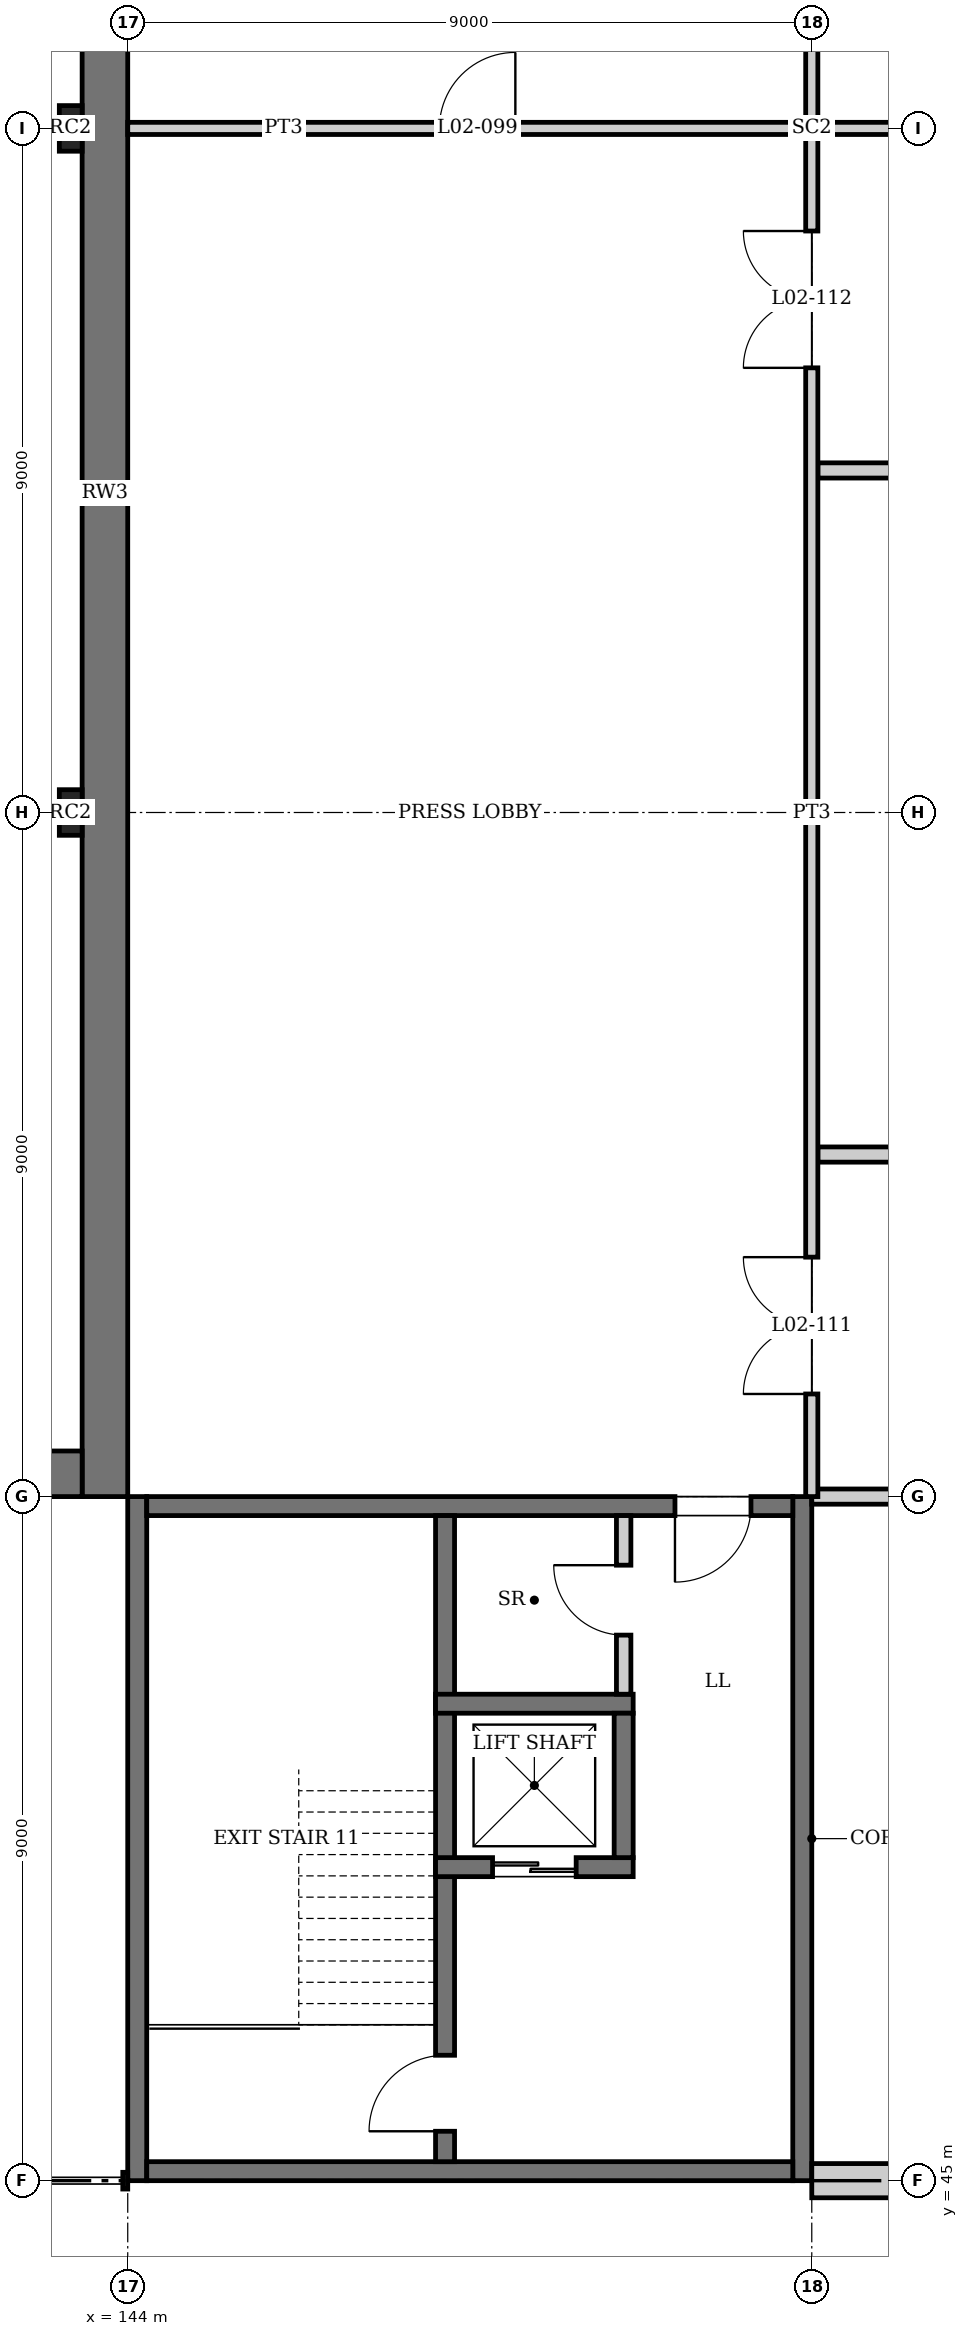
"""IFC4 building model, lengths in metres.
Left out: names, types, materials, properties, quantities, classifications, styles, units other than length and angle.
Written with IfcOpenShell. Run it as: python <this file> out.ifc"""

import sys

from ifc_helpers import new_model, si_unit, direction, frame, frame_2d, origin, origin_2d, place, context, subcontext, project, spatial, rectangle, i_section, extrude, element, fill, save


model = new_model("IFC4")
c1 = context("Model", 3, precision=1e-05, world=origin(), true_north=direction((0.0, 1.0)))
c2 = subcontext(c1, "Body", "Model", "MODEL_VIEW")
j1 = project(units=[si_unit("LENGTHUNIT", "METRE"), si_unit("PLANEANGLEUNIT", "RADIAN")], contexts=[c1])
p1 = place(None, origin())
s1 = spatial("IfcSite", under=j1, at=p1, CompositionType="ELEMENT")
p2 = place(p1, origin())
s2 = spatial("IfcBuilding", under=s1, at=p2, CompositionType="ELEMENT")
p3 = place(p2, frame((0.0, 0.0, 10.5)))
s3 = spatial("IfcBuildingStorey", under=s2, at=p3, CompositionType="ELEMENT", Elevation=10.5)
p4 = place(p3, frame((153.0, 72.0, 0.0), z_axis=(0.0, 0.0, 1.0), x_axis=(0.0, 1.0, 0.0)))
e1 = element("IfcColumn", 1, at=p4, inside=s3, PredefinedType="COLUMN", context=c2, shape_type="SweptSolid", body=[
    extrude(i_section(OverallWidth=0.256, OverallDepth=0.26, WebThickness=0.01, FlangeThickness=0.017, at=origin_2d()), origin(), (0.0, 0.0, 1.0), 4.5),
])
for number, where, z_axis, x_axis in (
    (2, (144.125, 45.0, 0.0), (0.0, 0.0, 1.0), (0.0, 1.0, 0.0)),
    (3, (152.875, 45.0, 0.0), (0.0, 0.0, 1.0), (0.0, 1.0, 0.0)),
):
    element("IfcWall", number, at=place(p3, frame(where, z_axis=z_axis, x_axis=x_axis)), inside=s3, PredefinedType="SHEAR", context=c2, shape_type="SweptSolid", body=[
        extrude(rectangle(XDim=9.0, YDim=0.25, at=frame_2d((4.5, 0.0))), origin(), (0.0, 0.0, 1.0), 4.35),
    ])
p5 = place(p3, frame((144.25, 45.125, 0.0), z_axis=(0.0, 0.0, 1.0), x_axis=(1.0, 0.0, 0.0)))
e4 = element("IfcWall", 4, at=p5, inside=s3, PredefinedType="SHEAR", context=c2, shape_type="SweptSolid", body=[
    extrude(rectangle(XDim=8.5, YDim=0.25, at=frame_2d((4.25, 0.0))), origin(), (0.0, 0.0, 1.0), 4.35),
])
p6 = place(p3, frame((144.25, 53.875, 0.0), z_axis=(0.0, 0.0, 1.0), x_axis=(1.0, 0.0, 0.0)))
e5 = element("IfcWall", 5, at=p6, inside=s3, PredefinedType="SHEAR", context=c2, shape_type="SweptSolid", body=[
    extrude(rectangle(XDim=8.5, YDim=0.25, at=frame_2d((4.25, 0.0))), origin(), (0.0, 0.0, 1.0), 4.35),
])
p7 = place(p6, frame((6.95, 0.0, 0.0)))
e6 = element("IfcOpeningElement", 6, at=p7, cuts=e5, PredefinedType="OPENING", context=c2, shape_type="SweptSolid", body=[
    extrude(rectangle(XDim=1.0, YDim=2.1, at=frame_2d((0.5, 1.05))), frame((0.0, 0.135, 0.0), z_axis=(0.0, -1.0, 0.0), x_axis=(1.0, 0.0, 0.0)), (0.0, 0.0, 1.0), 0.27),
])
p8 = place(p3, frame((143.7, 54.0, 0.0), z_axis=(0.0, 0.0, 1.0), x_axis=(0.0, 1.0, 0.0)))
e7 = element("IfcWall", 7, at=p8, inside=s3, PredefinedType="SHEAR", context=c2, shape_type="SweptSolid", body=[
    extrude(rectangle(XDim=26.4, YDim=0.6, at=frame_2d((13.2, 0.0))), origin(), (0.0, 0.0, 1.0), 4.5),
])
p9 = place(p3, frame((117.6, 54.3, 0.0), z_axis=(0.0, 0.0, 1.0), x_axis=(1.0, 0.0, 0.0)))
e8 = element("IfcWall", 8, at=p9, inside=s3, PredefinedType="SHEAR", context=c2, shape_type="SweptSolid", body=[
    extrude(rectangle(XDim=25.8, YDim=0.6, at=frame_2d((12.9, 0.0))), origin(), (0.0, 0.0, 1.0), 4.5),
])
p10 = place(p9, frame((1.0, 0.0, 0.0)))
e9 = element("IfcOpeningElement", 9, at=p10, cuts=e8, PredefinedType="OPENING", context=c2, shape_type="SweptSolid", body=[
    extrude(rectangle(XDim=1.0, YDim=2.1, at=frame_2d((0.5, 1.05))), frame((0.0, 0.31, 0.0), z_axis=(0.0, -1.0, 0.0), x_axis=(1.0, 0.0, 0.0)), (0.0, 0.0, 1.0), 0.62),
])
for number, where, z_axis, x_axis in (
    (10, (143.25, 63.0, 0.0), (0.0, 0.0, 1.0), (0.0, 1.0, 0.0)),
    (11, (143.25, 72.0, 0.0), (0.0, 0.0, 1.0), (0.0, 1.0, 0.0)),
):
    element("IfcColumn", number, at=place(p3, frame(where, z_axis=z_axis, x_axis=x_axis)), inside=s3, PredefinedType="PILASTER", context=c2, shape_type="SweptSolid", body=[
        extrude(rectangle(XDim=0.6, YDim=0.3, at=origin_2d()), origin(), (0.0, 0.0, 1.0), 4.5),
    ])
p11 = place(p3, frame((153.0, 45.0, 0.0), z_axis=(0.0, 0.0, 1.0), x_axis=(1.0, 0.0, 0.0)))
e12 = element("IfcWall", 12, at=p11, inside=s3, PredefinedType="SOLIDWALL", context=c2, shape_type="SweptSolid", body=[
    extrude(rectangle(XDim=8.873, YDim=0.45, at=frame_2d((4.437, 0.0))), origin(), (0.0, 0.0, 1.0), 3.991),
])
p12 = place(p11, frame((1.05, 0.0, 0.9)))
e13 = element("IfcOpeningElement", 13, at=p12, cuts=e12, PredefinedType="OPENING", context=c2, shape_type="SweptSolid", body=[
    extrude(rectangle(XDim=2.4, YDim=2.1, at=frame_2d((1.2, 1.05))), frame((0.0, 0.235, 0.0), z_axis=(0.0, -1.0, 0.0), x_axis=(1.0, 0.0, 0.0)), (0.0, 0.0, 1.0), 0.47),
])
p13 = place(p11, frame((5.55, 0.0, 0.9)))
e14 = element("IfcOpeningElement", 14, at=p13, cuts=e12, PredefinedType="OPENING", context=c2, shape_type="SweptSolid", body=[
    extrude(rectangle(XDim=2.4, YDim=2.1, at=frame_2d((1.2, 1.05))), frame((0.0, 0.235, 0.0), z_axis=(0.0, -1.0, 0.0), x_axis=(1.0, 0.0, 0.0)), (0.0, 0.0, 1.0), 0.47),
])
p14 = place(p3, frame((148.175, 45.25, 0.0), z_axis=(0.0, 0.0, 1.0), x_axis=(0.0, 1.0, 0.0)))
e15 = element("IfcWall", 15, at=p14, inside=s3, PredefinedType="SOLIDWALL", context=c2, shape_type="SweptSolid", body=[
    extrude(rectangle(XDim=8.5, YDim=0.25, at=frame_2d((4.25, 0.0))), origin(), (0.0, 0.0, 1.0), 4.35),
])
p15 = place(p14, frame((0.4, 0.0, 0.0)))
e16 = element("IfcOpeningElement", 16, at=p15, cuts=e15, PredefinedType="OPENING", context=c2, shape_type="SweptSolid", body=[
    extrude(rectangle(XDim=1.0, YDim=2.1, at=frame_2d((0.5, 1.05))), frame((0.0, 0.135, 0.0), z_axis=(0.0, -1.0, 0.0), x_axis=(1.0, 0.0, 0.0)), (0.0, 0.0, 1.0), 0.27),
])
p16 = place(p3, frame((148.05, 49.125, 0.0), z_axis=(0.0, 0.0, 1.0), x_axis=(1.0, 0.0, 0.0)))
e17 = element("IfcWall", 17, at=p16, inside=s3, PredefinedType="SOLIDWALL", context=c2, shape_type="SweptSolid", body=[
    extrude(rectangle(XDim=2.6, YDim=0.25, at=frame_2d((1.3, 0.0))), origin(), (0.0, 0.0, 1.0), 4.35),
])
p17 = place(p16, frame((0.75, 0.0, 0.0)))
e18 = element("IfcOpeningElement", 18, at=p17, cuts=e17, PredefinedType="OPENING", context=c2, shape_type="SweptSolid", body=[
    extrude(rectangle(XDim=1.1, YDim=2.1, at=frame_2d((0.55, 1.05))), frame((0.0, 0.135, 0.0), z_axis=(0.0, -1.0, 0.0), x_axis=(1.0, 0.0, 0.0)), (0.0, 0.0, 1.0), 0.27),
])
p18 = place(p3, frame((148.05, 51.275, 0.0), z_axis=(0.0, 0.0, 1.0), x_axis=(1.0, 0.0, 0.0)))
e19 = element("IfcWall", 19, at=p18, inside=s3, PredefinedType="SOLIDWALL", context=c2, shape_type="SweptSolid", body=[
    extrude(rectangle(XDim=2.6, YDim=0.25, at=frame_2d((1.3, 0.0))), origin(), (0.0, 0.0, 1.0), 4.35),
])
p19 = place(p3, frame((150.525, 49.25, 0.0), z_axis=(0.0, 0.0, 1.0), x_axis=(0.0, 1.0, 0.0)))
e20 = element("IfcWall", 20, at=p19, inside=s3, PredefinedType="SOLIDWALL", context=c2, shape_type="SweptSolid", body=[
    extrude(rectangle(XDim=1.9, YDim=0.25, at=frame_2d((0.95, 0.0))), origin(), (0.0, 0.0, 1.0), 4.35),
])
p20 = place(p3, frame((153.0, 54.0, 0.0), z_axis=(0.0, 0.0, 1.0), x_axis=(1.0, 0.0, 0.0)))
e21 = element("IfcWall", 21, at=p20, inside=s3, PredefinedType="PARTITIONING", context=c2, shape_type="SweptSolid", body=[
    extrude(rectangle(XDim=8.87, YDim=0.2, at=frame_2d((4.435, 0.0))), origin(), (0.0, 0.0, 1.0), 3.738),
])
p21 = place(p20, frame((6.6, 0.0, 0.0)))
e22 = element("IfcOpeningElement", 22, at=p21, cuts=e21, PredefinedType="OPENING", context=c2, shape_type="SweptSolid", body=[
    extrude(rectangle(XDim=1.8, YDim=2.1, at=frame_2d((0.9, 1.05))), frame((0.0, 0.11, 0.0), z_axis=(0.0, -1.0, 0.0), x_axis=(1.0, 0.0, 0.0)), (0.0, 0.0, 1.0), 0.22),
])
p22 = place(p3, frame((153.08, 58.5, 0.0), z_axis=(0.0, 0.0, 1.0), x_axis=(1.0, 0.0, 0.0)))
e23 = element("IfcWall", 23, at=p22, inside=s3, PredefinedType="PARTITIONING", context=c2, shape_type="SweptSolid", body=[
    extrude(rectangle(XDim=26.77, YDim=0.2, at=frame_2d((13.385, 0.0))), origin(), (0.0, 0.0, 1.0), 3.65),
])
p23 = place(p22, frame((4.02, 0.0, 0.0)))
e24 = element("IfcOpeningElement", 24, at=p23, cuts=e23, PredefinedType="OPENING", context=c2, shape_type="SweptSolid", body=[
    extrude(rectangle(XDim=1.0, YDim=2.1, at=frame_2d((0.5, 1.05))), frame((0.0, 0.11, 0.0), z_axis=(0.0, -1.0, 0.0), x_axis=(1.0, 0.0, 0.0)), (0.0, 0.0, 1.0), 0.22),
])
p24 = place(p22, frame((17.02, 0.0, 0.0)))
e25 = element("IfcOpeningElement", 25, at=p24, cuts=e23, PredefinedType="OPENING", context=c2, shape_type="SweptSolid", body=[
    extrude(rectangle(XDim=1.8, YDim=2.1, at=frame_2d((0.9, 1.05))), frame((0.0, 0.11, 0.0), z_axis=(0.0, -1.0, 0.0), x_axis=(1.0, 0.0, 0.0)), (0.0, 0.0, 1.0), 0.22),
])
p25 = place(p3, frame((153.08, 67.5, 0.0), z_axis=(0.0, 0.0, 1.0), x_axis=(1.0, 0.0, 0.0)))
e26 = element("IfcWall", 26, at=p25, inside=s3, PredefinedType="PARTITIONING", context=c2, shape_type="SweptSolid", body=[
    extrude(rectangle(XDim=26.77, YDim=0.2, at=frame_2d((13.385, 0.0))), origin(), (0.0, 0.0, 1.0), 3.65),
])
p26 = place(p3, frame((144.0, 72.0, 0.0), z_axis=(0.0, 0.0, 1.0), x_axis=(1.0, 0.0, 0.0)))
e27 = element("IfcWall", 27, at=p26, inside=s3, PredefinedType="PARTITIONING", context=c2, shape_type="SweptSolid", body=[
    extrude(rectangle(XDim=8.87, YDim=0.16, at=frame_2d((4.435, 0.0))), origin(), (0.0, 0.0, 1.0), 3.738),
])
p27 = place(p26, frame((4.1, 0.0, 0.0)))
e28 = element("IfcOpeningElement", 28, at=p27, cuts=e27, PredefinedType="OPENING", context=c2, shape_type="SweptSolid", body=[
    extrude(rectangle(XDim=1.0, YDim=2.1, at=frame_2d((0.5, 1.05))), frame((0.0, 0.09, 0.0), z_axis=(0.0, -1.0, 0.0), x_axis=(1.0, 0.0, 0.0)), (0.0, 0.0, 1.0), 0.18),
])
p28 = place(p3, frame((153.13, 72.0, 0.0), z_axis=(0.0, 0.0, 1.0), x_axis=(1.0, 0.0, 0.0)))
e29 = element("IfcWall", 29, at=p28, inside=s3, PredefinedType="PARTITIONING", context=c2, shape_type="SweptSolid", body=[
    extrude(rectangle(XDim=8.74, YDim=0.16, at=frame_2d((4.37, 0.0))), origin(), (0.0, 0.0, 1.0), 3.738),
])
p29 = place(p28, frame((3.97, 0.0, 0.0)))
e30 = element("IfcOpeningElement", 30, at=p29, cuts=e29, PredefinedType="OPENING", context=c2, shape_type="SweptSolid", body=[
    extrude(rectangle(XDim=1.0, YDim=2.1, at=frame_2d((0.5, 1.05))), frame((0.0, 0.09, 0.0), z_axis=(0.0, -1.0, 0.0), x_axis=(1.0, 0.0, 0.0)), (0.0, 0.0, 1.0), 0.18),
])
p30 = place(p3, frame((150.525, 51.4, 0.0), z_axis=(0.0, 0.0, 1.0), x_axis=(0.0, 1.0, 0.0)))
e31 = element("IfcWall", 31, at=p30, inside=s3, PredefinedType="PARTITIONING", context=c2, shape_type="SweptSolid", body=[
    extrude(rectangle(XDim=2.35, YDim=0.19, at=frame_2d((1.175, 0.0))), origin(), (0.0, 0.0, 1.0), 4.35),
])
p31 = place(p30, frame((0.778, 0.0, 0.0)))
e32 = element("IfcOpeningElement", 32, at=p31, cuts=e31, PredefinedType="OPENING", context=c2, shape_type="SweptSolid", body=[
    extrude(rectangle(XDim=0.92, YDim=2.1, at=frame_2d((0.46, 1.05))), frame((0.0, 0.105, 0.0), z_axis=(0.0, -1.0, 0.0), x_axis=(1.0, 0.0, 0.0)), (0.0, 0.0, 1.0), 0.21),
])
p32 = place(p3, frame((153.0, 54.0, 0.0), z_axis=(0.0, 0.0, 1.0), x_axis=(0.0, 1.0, 0.0)))
e33 = element("IfcWall", 33, at=p32, inside=s3, PredefinedType="PARTITIONING", context=c2, shape_type="SweptSolid", body=[
    extrude(rectangle(XDim=17.87, YDim=0.16, at=frame_2d((8.935, 0.0))), origin(), (0.0, 0.0, 1.0), 3.65),
])
p33 = place(p32, frame((1.35, 0.0, 0.0)))
e34 = element("IfcOpeningElement", 34, at=p33, cuts=e33, PredefinedType="OPENING", context=c2, shape_type="SweptSolid", body=[
    extrude(rectangle(XDim=1.8, YDim=2.1, at=frame_2d((0.9, 1.05))), frame((0.0, 0.09, 0.0), z_axis=(0.0, -1.0, 0.0), x_axis=(1.0, 0.0, 0.0)), (0.0, 0.0, 1.0), 0.18),
])
p34 = place(p32, frame((14.85, 0.0, 0.0)))
e35 = element("IfcOpeningElement", 35, at=p34, cuts=e33, PredefinedType="OPENING", context=c2, shape_type="SweptSolid", body=[
    extrude(rectangle(XDim=1.8, YDim=2.1, at=frame_2d((0.9, 1.05))), frame((0.0, 0.09, 0.0), z_axis=(0.0, -1.0, 0.0), x_axis=(1.0, 0.0, 0.0)), (0.0, 0.0, 1.0), 0.18),
])
p35 = place(p3, frame((153.0, 72.13, 0.0), z_axis=(0.0, 0.0, 1.0), x_axis=(0.0, 1.0, 0.0)))
e36 = element("IfcWall", 36, at=p35, inside=s3, PredefinedType="PARTITIONING", context=c2, shape_type="SweptSolid", body=[
    extrude(rectangle(XDim=2.79, YDim=0.16, at=frame_2d((1.395, 0.0))), origin(), (0.0, 0.0, 1.0), 4.043),
])
p36 = place(p17, origin())
e37 = element("IfcDoor", 37, at=p36, inside=s3, OperationType="DOUBLE_DOOR_SLIDING", PredefinedType="DOOR", context=c2, shape_type="SweptSolid", body=[
    extrude(rectangle(XDim=1.1, YDim=2.1, at=frame_2d((0.55, 1.05))), frame((0.0, 0.025, 0.0), z_axis=(0.0, -1.0, 0.0), x_axis=(1.0, 0.0, 0.0)), (0.0, 0.0, 1.0), 0.05),
])
fill(e18, e37)
p37 = place(p15, origin())
e38 = element("IfcDoor", 38, at=p37, inside=s3, OperationType="SINGLE_SWING_LEFT", PredefinedType="DOOR", context=c2, shape_type="SweptSolid", body=[
    extrude(rectangle(XDim=1.0, YDim=2.1, at=frame_2d((0.5, 1.05))), frame((0.0, 0.025, 0.0), z_axis=(0.0, -1.0, 0.0), x_axis=(1.0, 0.0, 0.0)), (0.0, 0.0, 1.0), 0.05),
])
fill(e16, e38)
p38 = place(p7, frame((1.0, 0.0, 0.0), z_axis=(0.0, 0.0, 1.0), x_axis=(-1.0, 0.0, 0.0)))
e39 = element("IfcDoor", 39, at=p38, inside=s3, OperationType="SINGLE_SWING_RIGHT", PredefinedType="DOOR", context=c2, shape_type="SweptSolid", body=[
    extrude(rectangle(XDim=1.0, YDim=2.1, at=frame_2d((0.5, 1.05))), frame((0.0, 0.025, 0.0), z_axis=(0.0, -1.0, 0.0), x_axis=(1.0, 0.0, 0.0)), (0.0, 0.0, 1.0), 0.05),
])
fill(e6, e39)
p39 = place(p31, origin())
e40 = element("IfcDoor", 40, at=p39, inside=s3, OperationType="SINGLE_SWING_RIGHT", PredefinedType="DOOR", context=c2, shape_type="SweptSolid", body=[
    extrude(rectangle(XDim=0.92, YDim=2.1, at=frame_2d((0.46, 1.05))), frame((0.0, 0.025, 0.0), z_axis=(0.0, -1.0, 0.0), x_axis=(1.0, 0.0, 0.0)), (0.0, 0.0, 1.0), 0.05),
])
fill(e32, e40)
p40 = place(p27, origin())
e41 = element("IfcDoor", 41, at=p40, inside=s3, OperationType="SINGLE_SWING_RIGHT", PredefinedType="DOOR", context=c2, shape_type="SweptSolid", body=[
    extrude(rectangle(XDim=1.0, YDim=2.1, at=frame_2d((0.5, 1.05))), frame((0.0, 0.025, 0.0), z_axis=(0.0, -1.0, 0.0), x_axis=(1.0, 0.0, 0.0)), (0.0, 0.0, 1.0), 0.05),
])
fill(e28, e41)
p41 = place(p33, origin())
e42 = element("IfcDoor", 42, at=p41, inside=s3, OperationType="DOUBLE_DOOR_SINGLE_SWING", PredefinedType="DOOR", context=c2, shape_type="SweptSolid", body=[
    extrude(rectangle(XDim=1.8, YDim=2.1, at=frame_2d((0.9, 1.05))), frame((0.0, 0.025, 0.0), z_axis=(0.0, -1.0, 0.0), x_axis=(1.0, 0.0, 0.0)), (0.0, 0.0, 1.0), 0.05),
])
fill(e34, e42)
p42 = place(p34, origin())
e43 = element("IfcDoor", 43, at=p42, inside=s3, OperationType="DOUBLE_DOOR_SINGLE_SWING", PredefinedType="DOOR", context=c2, shape_type="SweptSolid", body=[
    extrude(rectangle(XDim=1.8, YDim=2.1, at=frame_2d((0.9, 1.05))), frame((0.0, 0.025, 0.0), z_axis=(0.0, -1.0, 0.0), x_axis=(1.0, 0.0, 0.0)), (0.0, 0.0, 1.0), 0.05),
])
fill(e35, e43)
save(model, sys.argv[1])
